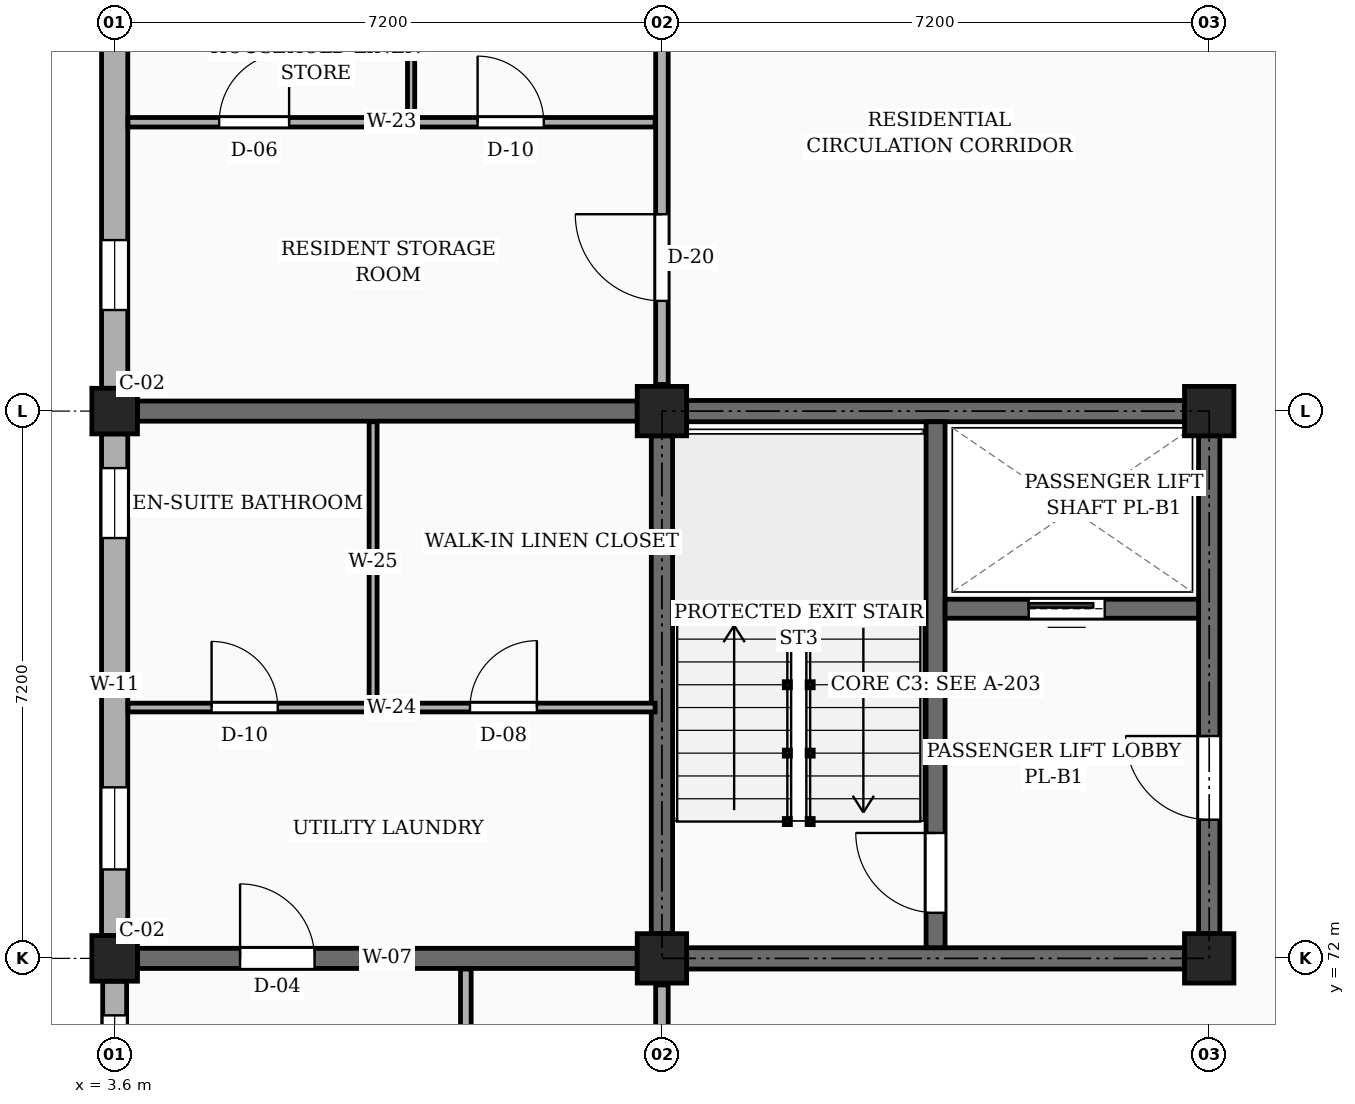
"""IFC4 building model, lengths in metres.
Left out: names, types, materials, properties, quantities, classifications, styles, units other than length and angle.
Written with IfcOpenShell. Run it as: python <this file> out.ifc"""

import sys

from ifc_helpers import new_model, si_unit, direction, frame, frame_2d, origin, origin_2d, place, context, subcontext, project, spatial, rectangle, extrude, element, fill, save


model = new_model("IFC4")
c1 = context("Model", 3, precision=1e-05, world=origin(), true_north=direction((0.0, 1.0)))
c2 = subcontext(c1, "Body", "Model", "MODEL_VIEW")
j1 = project(units=[si_unit("LENGTHUNIT", "METRE"), si_unit("PLANEANGLEUNIT", "RADIAN")], contexts=[c1])
p1 = place(None, origin())
s1 = spatial("IfcSite", under=j1, at=p1, CompositionType="ELEMENT")
p2 = place(p1, origin())
s2 = spatial("IfcBuilding", under=s1, at=p2, CompositionType="ELEMENT")
p3 = place(p2, frame((0.0, 0.0, 4.5)))
s3 = spatial("IfcBuildingStorey", under=s2, at=p3, CompositionType="ELEMENT", Elevation=4.5)
for number, where, z_axis, x_axis in (
    (1, (3.6, 72.0, 0.0), (0.0, 0.0, 1.0), (1.0, 0.0, 0.0)),
    (2, (3.6, 79.2, 0.0), (0.0, 0.0, 1.0), (1.0, 0.0, 0.0)),
):
    element("IfcColumn", number, at=place(p3, frame(where, z_axis=z_axis, x_axis=x_axis)), inside=s3, PredefinedType="COLUMN", context=c2, shape_type="SweptSolid", body=[
        extrude(rectangle(XDim=0.6, YDim=0.6, at=origin_2d()), origin(), (0.0, 0.0, 1.0), 3.15),
    ])
for number, where, z_axis, x_axis in (
    (3, (10.8, 72.0, 0.0), (0.0, 0.0, 1.0), (1.0, 0.0, 0.0)),
    (4, (10.8, 79.2, 0.0), (0.0, 0.0, 1.0), (1.0, 0.0, 0.0)),
    (5, (18.0, 72.0, 0.0), (0.0, 0.0, 1.0), (1.0, 0.0, 0.0)),
    (6, (18.0, 79.2, 0.0), (0.0, 0.0, 1.0), (1.0, 0.0, 0.0)),
):
    element("IfcColumn", number, at=place(p3, frame(where, z_axis=z_axis, x_axis=x_axis)), inside=s3, PredefinedType="COLUMN", context=c2, shape_type="SweptSolid", body=[
        extrude(rectangle(XDim=0.65, YDim=0.65, at=origin_2d()), origin(), (0.0, 0.0, 1.0), 3.15),
    ])
p4 = place(p3, frame((3.9, 72.0, 0.0), z_axis=(0.0, 0.0, 1.0), x_axis=(1.0, 0.0, 0.0)))
e7 = element("IfcWall", 7, at=p4, inside=s3, PredefinedType="SOLIDWALL", context=c2, shape_type="SweptSolid", body=[
    extrude(rectangle(XDim=6.575, YDim=0.265, at=frame_2d((3.288, 0.0))), origin(), (0.0, 0.0, 1.0), 2.21),
])
p5 = place(p4, frame((1.35, 0.0, 0.0)))
e8 = element("IfcOpeningElement", 8, at=p5, cuts=e7, PredefinedType="OPENING", context=c2, shape_type="SweptSolid", body=[
    extrude(rectangle(XDim=0.98, YDim=2.12, at=frame_2d((0.49, 1.06))), frame((0.0, 0.143, 0.0), z_axis=(0.0, -1.0, 0.0), x_axis=(1.0, 0.0, 0.0)), (0.0, 0.0, 1.0), 0.285),
])
p6 = place(p3, frame((3.9, 79.2, 0.0), z_axis=(0.0, 0.0, 1.0), x_axis=(1.0, 0.0, 0.0)))
e9 = element("IfcWall", 9, at=p6, inside=s3, PredefinedType="SOLIDWALL", context=c2, shape_type="SweptSolid", body=[
    extrude(rectangle(XDim=6.575, YDim=0.265, at=frame_2d((3.288, 0.0))), origin(), (0.0, 0.0, 1.0), 2.21),
])
p7 = place(p3, frame((3.6, 86.1, 0.0), z_axis=(0.0, 0.0, 1.0), x_axis=(0.0, -1.0, 0.0)))
e10 = element("IfcWall", 10, at=p7, inside=s3, PredefinedType="SOLIDWALL", context=c2, shape_type="SweptSolid", body=[
    extrude(rectangle(XDim=6.6, YDim=0.345, at=frame_2d((3.3, 0.0))), origin(), (0.0, 0.0, 1.0), 2.48),
])
p8 = place(p7, frame((0.45, 0.0, 0.78)))
e11 = element("IfcOpeningElement", 11, at=p8, cuts=e10, PredefinedType="OPENING", context=c2, shape_type="SweptSolid", body=[
    extrude(rectangle(XDim=1.45, YDim=1.44, at=frame_2d((0.725, 0.72))), frame((0.0, 0.183, 0.0), z_axis=(0.0, -1.0, 0.0), x_axis=(1.0, 0.0, 0.0)), (0.0, 0.0, 1.0), 0.365),
])
p9 = place(p7, frame((4.65, 0.0, 0.78)))
e12 = element("IfcOpeningElement", 12, at=p9, cuts=e10, PredefinedType="OPENING", context=c2, shape_type="SweptSolid", body=[
    extrude(rectangle(XDim=0.92, YDim=1.15, at=frame_2d((0.46, 0.575))), frame((0.0, 0.183, 0.0), z_axis=(0.0, -1.0, 0.0), x_axis=(1.0, 0.0, 0.0)), (0.0, 0.0, 1.0), 0.365),
])
p10 = place(p3, frame((3.6, 78.9, 0.0), z_axis=(0.0, 0.0, 1.0), x_axis=(0.0, -1.0, 0.0)))
e13 = element("IfcWall", 13, at=p10, inside=s3, PredefinedType="SOLIDWALL", context=c2, shape_type="SweptSolid", body=[
    extrude(rectangle(XDim=6.6, YDim=0.345, at=frame_2d((3.3, 0.0))), origin(), (0.0, 0.0, 1.0), 2.48),
])
p11 = place(p10, frame((0.45, 0.0, 0.78)))
e14 = element("IfcOpeningElement", 14, at=p11, cuts=e13, PredefinedType="OPENING", context=c2, shape_type="SweptSolid", body=[
    extrude(rectangle(XDim=0.92, YDim=1.15, at=frame_2d((0.46, 0.575))), frame((0.0, 0.183, 0.0), z_axis=(0.0, -1.0, 0.0), x_axis=(1.0, 0.0, 0.0)), (0.0, 0.0, 1.0), 0.365),
])
p12 = place(p10, frame((4.65, 0.0, 0.78)))
e15 = element("IfcOpeningElement", 15, at=p12, cuts=e13, PredefinedType="OPENING", context=c2, shape_type="SweptSolid", body=[
    extrude(rectangle(XDim=1.08, YDim=1.15, at=frame_2d((0.54, 0.575))), frame((0.0, 0.183, 0.0), z_axis=(0.0, -1.0, 0.0), x_axis=(1.0, 0.0, 0.0)), (0.0, 0.0, 1.0), 0.365),
])
p13 = place(p3, frame((3.6, 71.7, 0.0), z_axis=(0.0, 0.0, 1.0), x_axis=(0.0, -1.0, 0.0)))
e16 = element("IfcWall", 16, at=p13, inside=s3, PredefinedType="SOLIDWALL", context=c2, shape_type="SweptSolid", body=[
    extrude(rectangle(XDim=6.6, YDim=0.315, at=frame_2d((3.3, 0.0))), origin(), (0.0, 0.0, 1.0), 2.48),
])
p14 = place(p13, frame((0.45, 0.0, 0.78)))
e17 = element("IfcOpeningElement", 17, at=p14, cuts=e16, PredefinedType="OPENING", context=c2, shape_type="SweptSolid", body=[
    extrude(rectangle(XDim=1.08, YDim=1.15, at=frame_2d((0.54, 0.575))), frame((0.0, 0.167, 0.0), z_axis=(0.0, -1.0, 0.0), x_axis=(1.0, 0.0, 0.0)), (0.0, 0.0, 1.0), 0.335),
])
p15 = place(p13, frame((4.65, 0.0, 0.78)))
e18 = element("IfcOpeningElement", 18, at=p15, cuts=e16, PredefinedType="OPENING", context=c2, shape_type="SweptSolid", body=[
    extrude(rectangle(XDim=1.24, YDim=1.15, at=frame_2d((0.62, 0.575))), frame((0.0, 0.167, 0.0), z_axis=(0.0, -1.0, 0.0), x_axis=(1.0, 0.0, 0.0)), (0.0, 0.0, 1.0), 0.335),
])
for number, where, z_axis, x_axis in (
    (19, (10.8, 72.325, 0.0), (0.0, 0.0, 1.0), (0.0, 1.0, 0.0)),
    (20, (11.125, 79.2, 0.0), (0.0, 0.0, 1.0), (1.0, 0.0, 0.0)),
):
    element("IfcWall", number, at=place(p3, frame(where, z_axis=z_axis, x_axis=x_axis)), inside=s3, PredefinedType="SHEAR", context=c2, shape_type="SweptSolid", body=[
        extrude(rectangle(XDim=6.55, YDim=0.28, at=frame_2d((3.275, 0.0))), origin(), (0.0, 0.0, 1.0), 2.91),
    ])
p16 = place(p3, frame((18.0, 72.325, 0.0), z_axis=(0.0, 0.0, 1.0), x_axis=(0.0, 1.0, 0.0)))
e21 = element("IfcWall", 21, at=p16, inside=s3, PredefinedType="SHEAR", context=c2, shape_type="SweptSolid", body=[
    extrude(rectangle(XDim=6.55, YDim=0.28, at=frame_2d((3.275, 0.0))), origin(), (0.0, 0.0, 1.0), 2.91),
])
p17 = place(p16, frame((1.5, 0.0, 0.0)))
e22 = element("IfcOpeningElement", 22, at=p17, cuts=e21, PredefinedType="OPENING", context=c2, shape_type="SweptSolid", body=[
    extrude(rectangle(XDim=1.1, YDim=2.15, at=frame_2d((0.55, 1.075))), frame((0.0, 0.15, 0.0), z_axis=(0.0, -1.0, 0.0), x_axis=(1.0, 0.0, 0.0)), (0.0, 0.0, 1.0), 0.3),
])
p18 = place(p3, frame((11.125, 72.0, 0.0), z_axis=(0.0, 0.0, 1.0), x_axis=(1.0, 0.0, 0.0)))
e23 = element("IfcWall", 23, at=p18, inside=s3, PredefinedType="SHEAR", context=c2, shape_type="SweptSolid", body=[
    extrude(rectangle(XDim=6.55, YDim=0.28, at=frame_2d((3.275, 0.0))), origin(), (0.0, 0.0, 1.0), 2.91),
])
p19 = place(p3, frame((14.4, 72.14, 0.0), z_axis=(0.0, 0.0, 1.0), x_axis=(0.0, 1.0, 0.0)))
e24 = element("IfcWall", 24, at=p19, inside=s3, PredefinedType="SHEAR", context=c2, shape_type="SweptSolid", body=[
    extrude(rectangle(XDim=6.92, YDim=0.25, at=frame_2d((3.46, 0.0))), origin(), (0.0, 0.0, 1.0), 2.91),
])
p20 = place(p19, frame((0.46, 0.0, 0.0)))
e25 = element("IfcOpeningElement", 25, at=p20, cuts=e24, PredefinedType="OPENING", context=c2, shape_type="SweptSolid", body=[
    extrude(rectangle(XDim=1.05, YDim=2.15, at=frame_2d((0.525, 1.075))), frame((0.0, 0.135, 0.0), z_axis=(0.0, -1.0, 0.0), x_axis=(1.0, 0.0, 0.0)), (0.0, 0.0, 1.0), 0.27),
])
p21 = place(p3, frame((14.525, 76.6, 0.0), z_axis=(0.0, 0.0, 1.0), x_axis=(1.0, 0.0, 0.0)))
e26 = element("IfcWall", 26, at=p21, inside=s3, PredefinedType="SHEAR", context=c2, shape_type="SweptSolid", body=[
    extrude(rectangle(XDim=3.335, YDim=0.25, at=frame_2d((1.667, 0.0))), origin(), (0.0, 0.0, 1.0), 2.91),
])
p22 = place(p21, frame((1.1, 0.0, 0.0)))
e27 = element("IfcOpeningElement", 27, at=p22, cuts=e26, PredefinedType="OPENING", context=c2, shape_type="SweptSolid", body=[
    extrude(rectangle(XDim=1.0, YDim=2.2, at=frame_2d((0.5, 1.1))), frame((0.0, 0.135, 0.0), z_axis=(0.0, -1.0, 0.0), x_axis=(1.0, 0.0, 0.0)), (0.0, 0.0, 1.0), 0.27),
])
p23 = place(p3, frame((10.8, 65.15, 0.0), z_axis=(0.0, 0.0, 1.0), x_axis=(0.0, 1.0, 0.0)))
e28 = element("IfcWall", 28, at=p23, inside=s3, PredefinedType="PARTITIONING", context=c2, shape_type="SweptSolid", body=[
    extrude(rectangle(XDim=6.5, YDim=0.165, at=frame_2d((3.25, 0.0))), origin(), (0.0, 0.0, 1.0), 2.26),
])
p24 = place(p23, frame((1.0, 0.0, 0.0)))
e29 = element("IfcOpeningElement", 29, at=p24, cuts=e28, PredefinedType="OPENING", context=c2, shape_type="SweptSolid", body=[
    extrude(rectangle(XDim=0.94, YDim=2.12, at=frame_2d((0.47, 1.06))), frame((0.0, 0.093, 0.0), z_axis=(0.0, -1.0, 0.0), x_axis=(1.0, 0.0, 0.0)), (0.0, 0.0, 1.0), 0.185),
])
p25 = place(p3, frame((10.8, 79.55, 0.0), z_axis=(0.0, 0.0, 1.0), x_axis=(0.0, 1.0, 0.0)))
e30 = element("IfcWall", 30, at=p25, inside=s3, PredefinedType="PARTITIONING", context=c2, shape_type="SweptSolid", body=[
    extrude(rectangle(XDim=6.5, YDim=0.165, at=frame_2d((3.25, 0.0))), origin(), (0.0, 0.0, 1.0), 2.26),
])
p26 = place(p25, frame((1.1, 0.0, 0.0)))
e31 = element("IfcOpeningElement", 31, at=p26, cuts=e30, PredefinedType="OPENING", context=c2, shape_type="SweptSolid", body=[
    extrude(rectangle(XDim=1.14, YDim=2.18, at=frame_2d((0.57, 1.09))), frame((0.0, 0.093, 0.0), z_axis=(0.0, -1.0, 0.0), x_axis=(1.0, 0.0, 0.0)), (0.0, 0.0, 1.0), 0.185),
])
p27 = place(p3, frame((8.22, 64.975, 0.0), z_axis=(0.0, 0.0, 1.0), x_axis=(0.0, 1.0, 0.0)))
e32 = element("IfcWall", 32, at=p27, inside=s3, PredefinedType="PARTITIONING", context=c2, shape_type="SweptSolid", body=[
    extrude(rectangle(XDim=6.885, YDim=0.14, at=frame_2d((3.442, 0.0))), origin(), (0.0, 0.0, 1.0), 2.345),
])
p28 = place(p27, frame((1.275, 0.0, 0.0)))
e33 = element("IfcOpeningElement", 33, at=p28, cuts=e32, PredefinedType="OPENING", context=c2, shape_type="SweptSolid", body=[
    extrude(rectangle(XDim=0.95, YDim=2.1, at=frame_2d((0.475, 1.05))), frame((0.0, 0.08, 0.0), z_axis=(0.0, -1.0, 0.0), x_axis=(1.0, 0.0, 0.0)), (0.0, 0.0, 1.0), 0.16),
])
p29 = place(p3, frame((3.775, 75.3, 0.0), z_axis=(0.0, 0.0, 1.0), x_axis=(1.0, 0.0, 0.0)))
e34 = element("IfcWall", 34, at=p29, inside=s3, PredefinedType="PARTITIONING", context=c2, shape_type="SweptSolid", body=[
    extrude(rectangle(XDim=6.935, YDim=0.115, at=frame_2d((3.468, 0.0))), origin(), (0.0, 0.0, 1.0), 2.345),
])
p30 = place(p29, frame((1.1, 0.0, 0.0)))
e35 = element("IfcOpeningElement", 35, at=p30, cuts=e34, PredefinedType="OPENING", context=c2, shape_type="SweptSolid", body=[
    extrude(rectangle(XDim=0.87, YDim=2.05, at=frame_2d((0.435, 1.025))), frame((0.0, 0.067, 0.0), z_axis=(0.0, -1.0, 0.0), x_axis=(1.0, 0.0, 0.0)), (0.0, 0.0, 1.0), 0.135),
])
p31 = place(p29, frame((4.5, 0.0, 0.0)))
e36 = element("IfcOpeningElement", 36, at=p31, cuts=e34, PredefinedType="OPENING", context=c2, shape_type="SweptSolid", body=[
    extrude(rectangle(XDim=0.88, YDim=2.08, at=frame_2d((0.44, 1.04))), frame((0.0, 0.067, 0.0), z_axis=(0.0, -1.0, 0.0), x_axis=(1.0, 0.0, 0.0)), (0.0, 0.0, 1.0), 0.135),
])
p32 = place(p3, frame((7.0, 75.37, 0.0), z_axis=(0.0, 0.0, 1.0), x_axis=(0.0, 1.0, 0.0)))
e37 = element("IfcWall", 37, at=p32, inside=s3, PredefinedType="PARTITIONING", context=c2, shape_type="SweptSolid", body=[
    extrude(rectangle(XDim=3.69, YDim=0.105, at=frame_2d((1.845, 0.0))), origin(), (0.0, 0.0, 1.0), 2.345),
])
p33 = place(p3, frame((3.775, 83.0, 0.0), z_axis=(0.0, 0.0, 1.0), x_axis=(1.0, 0.0, 0.0)))
e38 = element("IfcWall", 38, at=p33, inside=s3, PredefinedType="PARTITIONING", context=c2, shape_type="SweptSolid", body=[
    extrude(rectangle(XDim=6.935, YDim=0.125, at=frame_2d((3.468, 0.0))), origin(), (0.0, 0.0, 1.0), 2.345),
])
p34 = place(p33, frame((4.6, 0.0, 0.0)))
e39 = element("IfcOpeningElement", 39, at=p34, cuts=e38, PredefinedType="OPENING", context=c2, shape_type="SweptSolid", body=[
    extrude(rectangle(XDim=0.87, YDim=2.05, at=frame_2d((0.435, 1.025))), frame((0.0, 0.073, 0.0), z_axis=(0.0, -1.0, 0.0), x_axis=(1.0, 0.0, 0.0)), (0.0, 0.0, 1.0), 0.145),
])
p35 = place(p33, frame((1.2, 0.0, 0.0)))
e40 = element("IfcOpeningElement", 40, at=p35, cuts=e38, PredefinedType="OPENING", context=c2, shape_type="SweptSolid", body=[
    extrude(rectangle(XDim=0.92, YDim=2.1, at=frame_2d((0.46, 1.05))), frame((0.0, 0.073, 0.0), z_axis=(0.0, -1.0, 0.0), x_axis=(1.0, 0.0, 0.0)), (0.0, 0.0, 1.0), 0.145),
])
p36 = place(p3, frame((7.5, 83.07, 0.0), z_axis=(0.0, 0.0, 1.0), x_axis=(0.0, 1.0, 0.0)))
e41 = element("IfcWall", 41, at=p36, inside=s3, PredefinedType="PARTITIONING", context=c2, shape_type="SweptSolid", body=[
    extrude(rectangle(XDim=3.19, YDim=0.095, at=frame_2d((1.595, 0.0))), origin(), (0.0, 0.0, 1.0), 2.345),
])
p37 = place(p9, origin())
e42 = element("IfcWindow", 42, at=p37, inside=s3, PartitioningType="SINGLE_PANEL", PredefinedType="WINDOW", context=c2, shape_type="SweptSolid", body=[
    extrude(rectangle(XDim=0.92, YDim=1.15, at=frame_2d((0.46, 0.575))), frame((0.0, 0.03, 0.0), z_axis=(0.0, -1.0, 0.0), x_axis=(1.0, 0.0, 0.0)), (0.0, 0.0, 1.0), 0.06),
])
fill(e12, e42)
p38 = place(p11, origin())
e43 = element("IfcWindow", 43, at=p38, inside=s3, PartitioningType="SINGLE_PANEL", PredefinedType="WINDOW", context=c2, shape_type="SweptSolid", body=[
    extrude(rectangle(XDim=0.92, YDim=1.15, at=frame_2d((0.46, 0.575))), frame((0.0, 0.03, 0.0), z_axis=(0.0, -1.0, 0.0), x_axis=(1.0, 0.0, 0.0)), (0.0, 0.0, 1.0), 0.06),
])
fill(e14, e43)
p39 = place(p12, origin())
e44 = element("IfcWindow", 44, at=p39, inside=s3, PartitioningType="SINGLE_PANEL", PredefinedType="WINDOW", context=c2, shape_type="SweptSolid", body=[
    extrude(rectangle(XDim=1.08, YDim=1.15, at=frame_2d((0.54, 0.575))), frame((0.0, 0.03, 0.0), z_axis=(0.0, -1.0, 0.0), x_axis=(1.0, 0.0, 0.0)), (0.0, 0.0, 1.0), 0.06),
])
fill(e15, e44)
p40 = place(p14, origin())
e45 = element("IfcWindow", 45, at=p40, inside=s3, PartitioningType="SINGLE_PANEL", PredefinedType="WINDOW", context=c2, shape_type="SweptSolid", body=[
    extrude(rectangle(XDim=1.08, YDim=1.15, at=frame_2d((0.54, 0.575))), frame((0.0, 0.03, 0.0), z_axis=(0.0, -1.0, 0.0), x_axis=(1.0, 0.0, 0.0)), (0.0, 0.0, 1.0), 0.06),
])
fill(e17, e45)
p41 = place(p17, frame((1.1, 0.0, 0.0), z_axis=(0.0, 0.0, 1.0), x_axis=(-1.0, 0.0, 0.0)))
e46 = element("IfcDoor", 46, at=p41, inside=s3, OperationType="SINGLE_SWING_RIGHT", PredefinedType="DOOR", context=c2, shape_type="SweptSolid", body=[
    extrude(rectangle(XDim=1.1, YDim=2.15, at=frame_2d((0.55, 1.075))), frame((0.0, 0.025, 0.0), z_axis=(0.0, -1.0, 0.0), x_axis=(1.0, 0.0, 0.0)), (0.0, 0.0, 1.0), 0.05),
])
fill(e22, e46)
p42 = place(p20, origin())
e47 = element("IfcDoor", 47, at=p42, inside=s3, OperationType="SINGLE_SWING_RIGHT", PredefinedType="DOOR", context=c2, shape_type="SweptSolid", body=[
    extrude(rectangle(XDim=1.05, YDim=2.15, at=frame_2d((0.525, 1.075))), frame((0.0, 0.025, 0.0), z_axis=(0.0, -1.0, 0.0), x_axis=(1.0, 0.0, 0.0)), (0.0, 0.0, 1.0), 0.05),
])
fill(e25, e47)
p43 = place(p22, origin())
e48 = element("IfcDoor", 48, at=p43, inside=s3, OperationType="SLIDING_TO_LEFT", PredefinedType="DOOR", context=c2, shape_type="SweptSolid", body=[
    extrude(rectangle(XDim=1.0, YDim=2.2, at=frame_2d((0.5, 1.1))), frame((0.0, 0.025, 0.0), z_axis=(0.0, -1.0, 0.0), x_axis=(1.0, 0.0, 0.0)), (0.0, 0.0, 1.0), 0.05),
])
fill(e27, e48)
p44 = place(p26, origin())
e49 = element("IfcDoor", 49, at=p44, inside=s3, OperationType="SINGLE_SWING_RIGHT", PredefinedType="DOOR", context=c2, shape_type="SweptSolid", body=[
    extrude(rectangle(XDim=1.14, YDim=2.18, at=frame_2d((0.57, 1.09))), frame((0.0, 0.025, 0.0), z_axis=(0.0, -1.0, 0.0), x_axis=(1.0, 0.0, 0.0)), (0.0, 0.0, 1.0), 0.05),
])
fill(e31, e49)
p45 = place(p30, origin())
e50 = element("IfcDoor", 50, at=p45, inside=s3, OperationType="SINGLE_SWING_LEFT", PredefinedType="DOOR", context=c2, shape_type="SweptSolid", body=[
    extrude(rectangle(XDim=0.87, YDim=2.05, at=frame_2d((0.435, 1.025))), frame((0.0, 0.025, 0.0), z_axis=(0.0, -1.0, 0.0), x_axis=(1.0, 0.0, 0.0)), (0.0, 0.0, 1.0), 0.05),
])
fill(e35, e50)
p46 = place(p31, origin())
e51 = element("IfcDoor", 51, at=p46, inside=s3, OperationType="SINGLE_SWING_RIGHT", PredefinedType="DOOR", context=c2, shape_type="SweptSolid", body=[
    extrude(rectangle(XDim=0.88, YDim=2.08, at=frame_2d((0.44, 1.04))), frame((0.0, 0.025, 0.0), z_axis=(0.0, -1.0, 0.0), x_axis=(1.0, 0.0, 0.0)), (0.0, 0.0, 1.0), 0.05),
])
fill(e36, e51)
p47 = place(p34, origin())
e52 = element("IfcDoor", 52, at=p47, inside=s3, OperationType="SINGLE_SWING_LEFT", PredefinedType="DOOR", context=c2, shape_type="SweptSolid", body=[
    extrude(rectangle(XDim=0.87, YDim=2.05, at=frame_2d((0.435, 1.025))), frame((0.0, 0.025, 0.0), z_axis=(0.0, -1.0, 0.0), x_axis=(1.0, 0.0, 0.0)), (0.0, 0.0, 1.0), 0.05),
])
fill(e39, e52)
p48 = place(p35, origin())
e53 = element("IfcDoor", 53, at=p48, inside=s3, OperationType="SINGLE_SWING_RIGHT", PredefinedType="DOOR", context=c2, shape_type="SweptSolid", body=[
    extrude(rectangle(XDim=0.92, YDim=2.1, at=frame_2d((0.46, 1.05))), frame((0.0, 0.025, 0.0), z_axis=(0.0, -1.0, 0.0), x_axis=(1.0, 0.0, 0.0)), (0.0, 0.0, 1.0), 0.05),
])
fill(e40, e53)
p49 = place(p5, origin())
e54 = element("IfcDoor", 54, at=p49, inside=s3, OperationType="SINGLE_SWING_LEFT", PredefinedType="DOOR", context=c2, shape_type="SweptSolid", body=[
    extrude(rectangle(XDim=0.98, YDim=2.12, at=frame_2d((0.49, 1.06))), frame((0.0, 0.025, 0.0), z_axis=(0.0, -1.0, 0.0), x_axis=(1.0, 0.0, 0.0)), (0.0, 0.0, 1.0), 0.05),
])
fill(e8, e54)
save(model, sys.argv[1])
